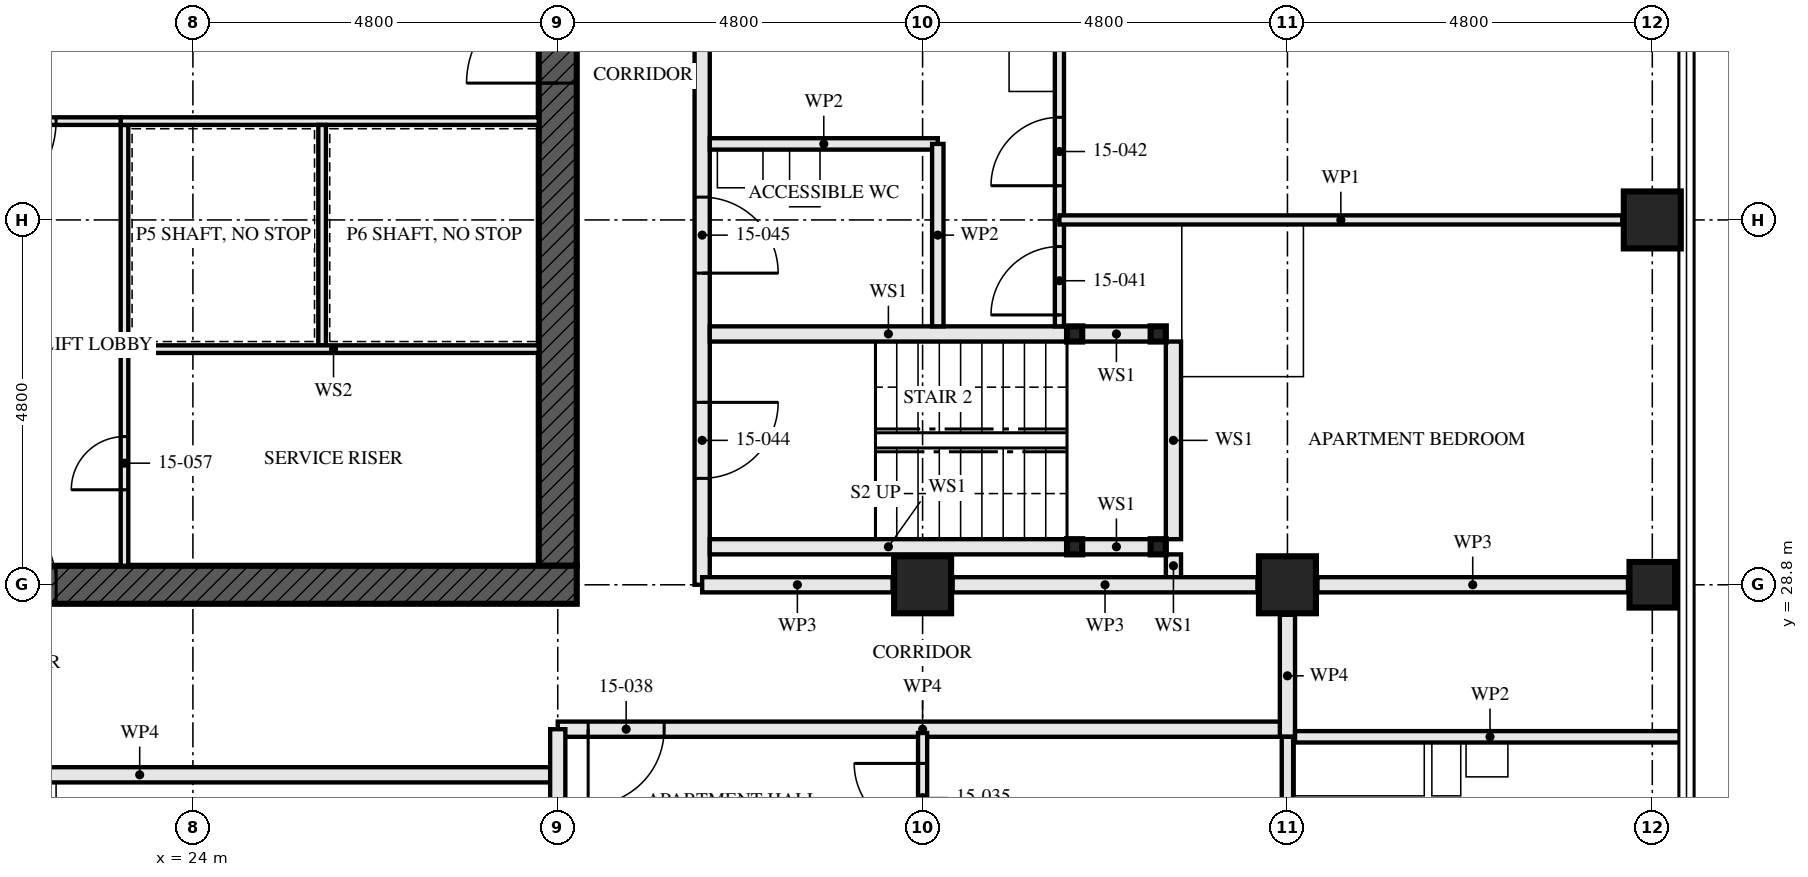
"""IFC4 building model, lengths in metres.
Left out: names, types, materials, properties, quantities, classifications, styles, units other than length and angle.
Written with IfcOpenShell. Run it as: python <this file> out.ifc"""

import sys

from ifc_helpers import new_model, si_unit, direction, frame, frame_2d, origin, origin_2d, place, context, subcontext, project, spatial, rectangle, hollow_rectangle, extrude, element, fill, save


model = new_model("IFC4")
c1 = context("Model", 3, precision=1e-05, world=origin(), true_north=direction((0.0, 1.0)))
c2 = subcontext(c1, "Body", "Model", "MODEL_VIEW")
j1 = project(units=[si_unit("LENGTHUNIT", "METRE"), si_unit("PLANEANGLEUNIT", "RADIAN")], contexts=[c1])
p1 = place(None, origin())
s1 = spatial("IfcSite", under=j1, at=p1, CompositionType="ELEMENT")
p2 = place(p1, origin())
s2 = spatial("IfcBuilding", under=s1, at=p2, CompositionType="ELEMENT")
p3 = place(p2, frame((0.0, 0.0, 58.5)))
s3 = spatial("IfcBuildingStorey", under=s2, at=p3, CompositionType="ELEMENT", Elevation=58.5)
for number, where, z_axis, x_axis in (
    (1, (33.6, 28.8, 0.0), (0.0, 0.0, 1.0), (0.0, 1.0, 0.0)),
    (2, (38.4, 28.8, 0.0), (0.0, 0.0, 1.0), (0.0, 1.0, 0.0)),
):
    element("IfcColumn", number, at=place(p3, frame(where, z_axis=z_axis, x_axis=x_axis)), inside=s3, PredefinedType="COLUMN", context=c2, shape_type="SweptSolid", body=[
        extrude(hollow_rectangle(XDim=0.75, YDim=0.75, WallThickness=0.08, at=origin_2d()), origin(), (0.0, 0.0, 1.0), 3.5),
    ])
p4 = place(p3, frame((43.2, 28.8, 0.0), z_axis=(0.0, 0.0, 1.0), x_axis=(0.0, 1.0, 0.0)))
e3 = element("IfcColumn", 3, at=p4, inside=s3, PredefinedType="COLUMN", context=c2, shape_type="SweptSolid", body=[
    extrude(hollow_rectangle(XDim=0.6, YDim=0.6, WallThickness=0.08, at=origin_2d()), origin(), (0.0, 0.0, 1.0), 3.5),
])
p5 = place(p3, frame((43.2, 33.6, 0.0), z_axis=(0.0, 0.0, 1.0), x_axis=(1.0, 0.0, 0.0)))
e4 = element("IfcColumn", 4, at=p5, inside=s3, PredefinedType="COLUMN", context=c2, shape_type="SweptSolid", body=[
    extrude(hollow_rectangle(XDim=0.75, YDim=0.75, WallThickness=0.08, at=origin_2d()), origin(), (0.0, 0.0, 1.0), 3.5),
])
p6 = place(p3, frame((14.15, 28.8, -0.17), z_axis=(0.0, 0.0, 1.0), x_axis=(1.0, 0.0, 0.0)))
e5 = element("IfcWall", 5, at=p6, inside=s3, PredefinedType="SHEAR", context=c2, shape_type="SweptSolid", body=[
    extrude(rectangle(XDim=14.9, YDim=0.5, at=frame_2d((7.45, 0.0))), origin(), (0.0, 0.0, 1.0), 3.5),
])
p7 = place(p6, frame((6.85, 0.0, 0.17)))
e6 = element("IfcOpeningElement", 6, at=p7, cuts=e5, PredefinedType="OPENING", context=c2, shape_type="SweptSolid", body=[
    extrude(rectangle(XDim=1.2, YDim=2.1, at=frame_2d((0.6, 1.05))), frame((0.0, 0.26, 0.0), z_axis=(0.0, -1.0, 0.0), x_axis=(1.0, 0.0, 0.0)), (0.0, 0.0, 1.0), 0.521),
])
p8 = place(p3, frame((28.8, 29.05, -0.17), z_axis=(0.0, 0.0, 1.0), x_axis=(0.0, 1.0, 0.0)))
e7 = element("IfcWall", 7, at=p8, inside=s3, PredefinedType="SHEAR", context=c2, shape_type="SweptSolid", body=[
    extrude(rectangle(XDim=13.9, YDim=0.5, at=frame_2d((6.95, 0.0))), origin(), (0.0, 0.0, 1.0), 3.5),
])
p9 = place(p8, frame((6.35, 0.0, 0.17)))
e8 = element("IfcOpeningElement", 8, at=p9, cuts=e7, PredefinedType="OPENING", context=c2, shape_type="SweptSolid", body=[
    extrude(rectangle(XDim=1.2, YDim=2.1, at=frame_2d((0.6, 1.05))), frame((0.0, 0.26, 0.0), z_axis=(0.0, -1.0, 0.0), x_axis=(1.0, 0.0, 0.0)), (0.0, 0.0, 1.0), 0.521),
])
for number, where, z_axis, x_axis in (
    (9, (36.7, 29.3, 0.0), (0.0, 0.0, 1.0), (1.0, 0.0, 0.0)),
    (10, (36.7, 32.1, 0.0), (0.0, 0.0, 1.0), (1.0, 0.0, 0.0)),
    (11, (35.6, 29.3, 0.0), (0.0, 0.0, 1.0), (1.0, 0.0, 0.0)),
    (12, (35.6, 32.1, 0.0), (0.0, 0.0, 1.0), (1.0, 0.0, 0.0)),
):
    element("IfcColumn", number, at=place(p3, frame(where, z_axis=z_axis, x_axis=x_axis)), inside=s3, PredefinedType="COLUMN", context=c2, shape_type="SweptSolid", body=[
        extrude(hollow_rectangle(XDim=0.2, YDim=0.2, WallThickness=0.008, at=origin_2d()), origin(), (0.0, 0.0, 1.0), 3.33),
    ])
p10 = place(p3, frame((17.8, 26.3, 0.0), z_axis=(0.0, 0.0, 1.0), x_axis=(1.0, 0.0, 0.0)))
e13 = element("IfcWall", 13, at=p10, inside=s3, PredefinedType="PARTITIONING", context=c2, shape_type="SweptSolid", body=[
    extrude(rectangle(XDim=11.0, YDim=0.2, at=frame_2d((5.5, 0.0))), origin(), (0.0, 0.0, 1.0), 2.55),
])
p11 = place(p10, frame((0.06, 0.0, 0.0)))
e14 = element("IfcOpeningElement", 14, at=p11, cuts=e13, PredefinedType="OPENING", context=c2, shape_type="SweptSolid", body=[
    extrude(rectangle(XDim=1.0, YDim=2.1, at=frame_2d((0.5, 1.05))), frame((0.0, 0.111, 0.0), z_axis=(0.0, -1.0, 0.0), x_axis=(1.0, 0.0, 0.0)), (0.0, 0.0, 1.0), 0.221),
])
p12 = place(p3, frame((38.4, 23.8, 0.0), z_axis=(0.0, 0.0, 1.0), x_axis=(0.0, 1.0, 0.0)))
e15 = element("IfcWall", 15, at=p12, inside=s3, PredefinedType="PARTITIONING", context=c2, shape_type="SweptSolid", body=[
    extrude(rectangle(XDim=3.0, YDim=0.15, at=frame_2d((1.5, 0.0))), origin(), (0.0, 0.0, 1.0), 2.55),
])
p13 = place(p12, frame((1.05, 0.0, 0.0)))
e16 = element("IfcOpeningElement", 16, at=p13, cuts=e15, PredefinedType="OPENING", context=c2, shape_type="SweptSolid", body=[
    extrude(rectangle(XDim=0.9, YDim=2.1, at=frame_2d((0.45, 1.05))), frame((0.0, 0.085, 0.0), z_axis=(0.0, -1.0, 0.0), x_axis=(1.0, 0.0, 0.0)), (0.0, 0.0, 1.0), 0.171),
])
p14 = place(p3, frame((33.6, 22.2, 0.0), z_axis=(0.0, 0.0, 1.0), x_axis=(0.0, 1.0, 0.0)))
e17 = element("IfcWall", 17, at=p14, inside=s3, PredefinedType="PARTITIONING", context=c2, shape_type="SweptSolid", body=[
    extrude(rectangle(XDim=4.65, YDim=0.12, at=frame_2d((2.325, 0.0))), origin(), (0.0, 0.0, 1.0), 2.55),
])
p15 = place(p14, frame((3.35, 0.0, 0.0)))
e18 = element("IfcOpeningElement", 18, at=p15, cuts=e17, PredefinedType="OPENING", context=c2, shape_type="SweptSolid", body=[
    extrude(rectangle(XDim=0.9, YDim=2.1, at=frame_2d((0.45, 1.05))), frame((0.0, 0.071, 0.0), z_axis=(0.0, -1.0, 0.0), x_axis=(1.0, 0.0, 0.0)), (0.0, 0.0, 1.0), 0.141),
])
p16 = place(p3, frame((28.8, 26.9, 0.0), z_axis=(0.0, 0.0, 1.0), x_axis=(1.0, 0.0, 0.0)))
e19 = element("IfcWall", 19, at=p16, inside=s3, PredefinedType="PARTITIONING", context=c2, shape_type="SweptSolid", body=[
    extrude(rectangle(XDim=9.6, YDim=0.2, at=frame_2d((4.8, 0.0))), origin(), (0.0, 0.0, 1.0), 3.33),
])
p17 = place(p16, frame((0.4, 0.0, 0.0)))
e20 = element("IfcOpeningElement", 20, at=p17, cuts=e19, PredefinedType="OPENING", context=c2, shape_type="SweptSolid", body=[
    extrude(rectangle(XDim=1.0, YDim=2.1, at=frame_2d((0.5, 1.05))), frame((0.0, 0.111, 0.0), z_axis=(0.0, -1.0, 0.0), x_axis=(1.0, 0.0, 0.0)), (0.0, 0.0, 1.0), 0.221),
])
p18 = place(p3, frame((38.4, 26.8, 0.0), z_axis=(0.0, 0.0, 1.0), x_axis=(0.0, 1.0, 0.0)))
e21 = element("IfcWall", 21, at=p18, inside=s3, PredefinedType="PARTITIONING", context=c2, shape_type="SweptSolid", body=[
    extrude(rectangle(XDim=1.605, YDim=0.2, at=frame_2d((0.802, 0.0))), origin(), (0.0, 0.0, 1.0), 3.33),
])
p19 = place(p3, frame((36.6, 29.3, 0.0), z_axis=(0.0, 0.0, 1.0), x_axis=(-1.0, 0.0, 0.0)))
e22 = element("IfcWall", 22, at=p19, inside=s3, PredefinedType="SOLIDWALL", context=c2, shape_type="SweptSolid", body=[
    extrude(rectangle(XDim=0.9, YDim=0.2, at=frame_2d((0.45, 0.0))), origin(), (0.0, 0.0, 1.0), 2.99),
])
p20 = place(p3, frame((35.5, 29.3, 0.0), z_axis=(0.0, 0.0, 1.0), x_axis=(-1.0, 0.0, 0.0)))
e23 = element("IfcWall", 23, at=p20, inside=s3, PredefinedType="SOLIDWALL", context=c2, shape_type="SweptSolid", body=[
    extrude(rectangle(XDim=4.7, YDim=0.2, at=frame_2d((2.35, 0.0))), origin(), (0.0, 0.0, 1.0), 2.99),
])
p21 = place(p3, frame((36.6, 32.1, 0.0), z_axis=(0.0, 0.0, 1.0), x_axis=(-1.0, 0.0, 0.0)))
e24 = element("IfcWall", 24, at=p21, inside=s3, PredefinedType="SOLIDWALL", context=c2, shape_type="SweptSolid", body=[
    extrude(rectangle(XDim=0.9, YDim=0.2, at=frame_2d((0.45, 0.0))), origin(), (0.0, 0.0, 1.0), 2.99),
])
p22 = place(p3, frame((35.5, 32.1, 0.0), z_axis=(0.0, 0.0, 1.0), x_axis=(-1.0, 0.0, 0.0)))
e25 = element("IfcWall", 25, at=p22, inside=s3, PredefinedType="SOLIDWALL", context=c2, shape_type="SweptSolid", body=[
    extrude(rectangle(XDim=4.7, YDim=0.2, at=frame_2d((2.35, 0.0))), origin(), (0.0, 0.0, 1.0), 2.99),
])
p23 = place(p3, frame((36.9, 28.9, 0.0), z_axis=(0.0, 0.0, 1.0), x_axis=(0.0, 1.0, 0.0)))
e26 = element("IfcWall", 26, at=p23, inside=s3, PredefinedType="SOLIDWALL", context=c2, shape_type="SweptSolid", body=[
    extrude(rectangle(XDim=0.3, YDim=0.2, at=frame_2d((0.15, 0.0))), origin(), (0.0, 0.0, 1.0), 3.33),
])
p24 = place(p3, frame((36.9, 29.4, 0.0), z_axis=(0.0, 0.0, 1.0), x_axis=(0.0, 1.0, 0.0)))
e27 = element("IfcWall", 27, at=p24, inside=s3, PredefinedType="SOLIDWALL", context=c2, shape_type="SweptSolid", body=[
    extrude(rectangle(XDim=2.6, YDim=0.2, at=frame_2d((1.3, 0.0))), origin(), (0.0, 0.0, 1.0), 3.33),
])
p25 = place(p3, frame((33.8, 32.2, 0.0), z_axis=(0.0, 0.0, 1.0), x_axis=(0.0, 1.0, 0.0)))
e28 = element("IfcWall", 28, at=p25, inside=s3, PredefinedType="PARTITIONING", context=c2, shape_type="SweptSolid", body=[
    extrude(rectangle(XDim=2.4, YDim=0.15, at=frame_2d((1.2, 0.0))), origin(), (0.0, 0.0, 1.0), 2.55),
])
p26 = place(p3, frame((33.8, 34.6, 0.0), z_axis=(0.0, 0.0, 1.0), x_axis=(-1.0, 0.0, 0.0)))
e29 = element("IfcWall", 29, at=p26, inside=s3, PredefinedType="PARTITIONING", context=c2, shape_type="SweptSolid", body=[
    extrude(rectangle(XDim=3.0, YDim=0.15, at=frame_2d((1.5, 0.0))), origin(), (0.0, 0.0, 1.0), 3.33),
])
p27 = place(p3, frame((35.4, 32.2, 0.0), z_axis=(0.0, 0.0, 1.0), x_axis=(0.0, 1.0, 0.0)))
e30 = element("IfcWall", 30, at=p27, inside=s3, PredefinedType="PARTITIONING", context=c2, shape_type="SweptSolid", body=[
    extrude(rectangle(XDim=1.4, YDim=0.12, at=frame_2d((0.7, 0.0))), origin(), (0.0, 0.0, 1.0), 3.33),
])
p28 = place(p27, frame((0.15, 0.0, 0.0)))
e31 = element("IfcOpeningElement", 31, at=p28, cuts=e30, PredefinedType="OPENING", context=c2, shape_type="SweptSolid", body=[
    extrude(rectangle(XDim=0.9, YDim=2.1, at=frame_2d((0.45, 1.05))), frame((0.0, 0.071, 0.0), z_axis=(0.0, -1.0, 0.0), x_axis=(1.0, 0.0, 0.0)), (0.0, 0.0, 1.0), 0.141),
])
p29 = place(p3, frame((35.4, 33.6, 0.0), z_axis=(0.0, 0.0, 1.0), x_axis=(0.0, 1.0, 0.0)))
e32 = element("IfcWall", 32, at=p29, inside=s3, PredefinedType="PARTITIONING", context=c2, shape_type="SweptSolid", body=[
    extrude(rectangle(XDim=4.8, YDim=0.12, at=frame_2d((2.4, 0.0))), origin(), (0.0, 0.0, 1.0), 3.33),
])
p30 = place(p29, frame((0.45, 0.0, 0.0)))
e33 = element("IfcOpeningElement", 33, at=p30, cuts=e32, PredefinedType="OPENING", context=c2, shape_type="SweptSolid", body=[
    extrude(rectangle(XDim=0.9, YDim=2.1, at=frame_2d((0.45, 1.05))), frame((0.0, 0.071, 0.0), z_axis=(0.0, -1.0, 0.0), x_axis=(1.0, 0.0, 0.0)), (0.0, 0.0, 1.0), 0.141),
])
p31 = place(p3, frame((42.805, 33.6, 0.0), z_axis=(0.0, 0.0, 1.0), x_axis=(-1.0, 0.0, 0.0)))
e34 = element("IfcWall", 34, at=p31, inside=s3, PredefinedType="PARTITIONING", context=c2, shape_type="SweptSolid", body=[
    extrude(rectangle(XDim=7.405, YDim=0.12, at=frame_2d((3.703, 0.0))), origin(), (0.0, 0.0, 1.0), 2.55),
])
p32 = place(p3, frame((30.7, 28.8, 0.0), z_axis=(0.0, 0.0, 1.0), x_axis=(0.0, 1.0, 0.0)))
e35 = element("IfcWall", 35, at=p32, inside=s3, PredefinedType="PARTITIONING", context=c2, shape_type="SweptSolid", body=[
    extrude(rectangle(XDim=14.4, YDim=0.2, at=frame_2d((7.2, 0.0))), origin(), (0.0, 0.0, 1.0), 2.55),
])
p33 = place(p32, frame((1.4, 0.0, 0.0)))
e36 = element("IfcOpeningElement", 36, at=p33, cuts=e35, PredefinedType="OPENING", context=c2, shape_type="SweptSolid", body=[
    extrude(rectangle(XDim=1.0, YDim=2.1, at=frame_2d((0.5, 1.05))), frame((0.0, 0.111, 0.0), z_axis=(0.0, -1.0, 0.0), x_axis=(1.0, 0.0, 0.0)), (0.0, 0.0, 1.0), 0.221),
])
p34 = place(p32, frame((4.1, 0.0, 0.0)))
e37 = element("IfcOpeningElement", 37, at=p34, cuts=e35, PredefinedType="OPENING", context=c2, shape_type="SweptSolid", body=[
    extrude(rectangle(XDim=1.0, YDim=2.1, at=frame_2d((0.5, 1.05))), frame((0.0, 0.111, 0.0), z_axis=(0.0, -1.0, 0.0), x_axis=(1.0, 0.0, 0.0)), (0.0, 0.0, 1.0), 0.221),
])
p35 = place(p32, frame((10.0, 0.0, 0.0)))
e38 = element("IfcOpeningElement", 38, at=p35, cuts=e35, PredefinedType="OPENING", context=c2, shape_type="SweptSolid", body=[
    extrude(rectangle(XDim=1.0, YDim=2.1, at=frame_2d((0.5, 1.05))), frame((0.0, 0.111, 0.0), z_axis=(0.0, -1.0, 0.0), x_axis=(1.0, 0.0, 0.0)), (0.0, 0.0, 1.0), 0.221),
])
p36 = place(p3, frame((23.1, 29.05, 0.0), z_axis=(0.0, 0.0, 1.0), x_axis=(0.0, 1.0, 0.0)))
e39 = element("IfcWall", 39, at=p36, inside=s3, PredefinedType="SOLIDWALL", context=c2, shape_type="SweptSolid", body=[
    extrude(rectangle(XDim=5.8, YDim=0.1, at=frame_2d((2.9, 0.0))), origin(), (0.0, 0.0, 1.0), 3.33),
])
p37 = place(p36, frame((1.0, 0.0, 0.0)))
e40 = element("IfcOpeningElement", 40, at=p37, cuts=e39, PredefinedType="OPENING", context=c2, shape_type="SweptSolid", body=[
    extrude(rectangle(XDim=0.7, YDim=2.1, at=frame_2d((0.35, 1.05))), frame((0.0, 0.061, 0.0), z_axis=(0.0, -1.0, 0.0), x_axis=(1.0, 0.0, 0.0)), (0.0, 0.0, 1.0), 0.121),
])
p38 = place(p3, frame((23.05, 34.9, 0.0), z_axis=(0.0, 0.0, 1.0), x_axis=(1.0, 0.0, 0.0)))
e41 = element("IfcWall", 41, at=p38, inside=s3, PredefinedType="SOLIDWALL", context=c2, shape_type="SweptSolid", body=[
    extrude(rectangle(XDim=5.5, YDim=0.1, at=frame_2d((2.75, 0.0))), origin(), (0.0, 0.0, 1.0), 3.33),
])
p39 = place(p3, frame((20.55, 34.9, 0.0), z_axis=(0.0, 0.0, 1.0), x_axis=(1.0, 0.0, 0.0)))
e42 = element("IfcWall", 42, at=p39, inside=s3, PredefinedType="SOLIDWALL", context=c2, shape_type="SweptSolid", body=[
    extrude(rectangle(XDim=2.5, YDim=0.1, at=frame_2d((1.25, 0.0))), origin(), (0.0, 0.0, 1.0), 3.33),
])
p40 = place(p39, frame((0.45, 0.0, 0.0)))
e43 = element("IfcOpeningElement", 43, at=p40, cuts=e42, PredefinedType="OPENING", context=c2, shape_type="SweptSolid", body=[
    extrude(rectangle(XDim=1.2, YDim=2.1, at=frame_2d((0.6, 1.05))), frame((0.0, 0.061, 0.0), z_axis=(0.0, -1.0, 0.0), x_axis=(1.0, 0.0, 0.0)), (0.0, 0.0, 1.0), 0.121),
])
p41 = place(p3, frame((25.7, 31.95, 0.0), z_axis=(0.0, 0.0, 1.0), x_axis=(0.0, 1.0, 0.0)))
e44 = element("IfcWall", 44, at=p41, inside=s3, PredefinedType="SOLIDWALL", context=c2, shape_type="SweptSolid", body=[
    extrude(rectangle(XDim=2.9, YDim=0.1, at=frame_2d((1.45, 0.0))), origin(), (0.0, 0.0, 1.0), 3.33),
])
p42 = place(p3, frame((23.15, 31.9, 0.0), z_axis=(0.0, 0.0, 1.0), x_axis=(1.0, 0.0, 0.0)))
e45 = element("IfcWall", 45, at=p42, inside=s3, PredefinedType="SOLIDWALL", context=c2, shape_type="SweptSolid", body=[
    extrude(rectangle(XDim=5.4, YDim=0.1, at=frame_2d((2.7, 0.0))), origin(), (0.0, 0.0, 1.0), 3.33),
])
p43 = place(p3, frame((28.8, 24.395, 0.0), z_axis=(0.0, 0.0, 1.0), x_axis=(0.0, 1.0, 0.0)))
e46 = element("IfcWall", 46, at=p43, inside=s3, PredefinedType="PARTITIONING", context=c2, shape_type="SweptSolid", body=[
    extrude(rectangle(XDim=2.505, YDim=0.2, at=frame_2d((1.252, 0.0))), origin(), (0.0, 0.0, 1.0), 2.32),
])
p44 = place(p3, frame((42.88, 28.8, 0.0), z_axis=(0.0, 0.0, 1.0), x_axis=(-1.0, 0.0, 0.0)))
e47 = element("IfcWall", 47, at=p44, inside=s3, PredefinedType="PARTITIONING", context=c2, shape_type="SweptSolid", body=[
    extrude(rectangle(XDim=4.085, YDim=0.2, at=frame_2d((2.042, 0.0))), origin(), (0.0, 0.0, 1.0), 2.32),
])
p45 = place(p3, frame((38.005, 28.8, 0.0), z_axis=(0.0, 0.0, 1.0), x_axis=(-1.0, 0.0, 0.0)))
e48 = element("IfcWall", 48, at=p45, inside=s3, PredefinedType="PARTITIONING", context=c2, shape_type="SweptSolid", body=[
    extrude(rectangle(XDim=4.01, YDim=0.2, at=frame_2d((2.005, 0.0))), origin(), (0.0, 0.0, 1.0), 2.32),
])
p46 = place(p3, frame((33.205, 28.8, 0.0), z_axis=(0.0, 0.0, 1.0), x_axis=(-1.0, 0.0, 0.0)))
e49 = element("IfcWall", 49, at=p46, inside=s3, PredefinedType="PARTITIONING", context=c2, shape_type="SweptSolid", body=[
    extrude(rectangle(XDim=2.505, YDim=0.2, at=frame_2d((1.252, 0.0))), origin(), (0.0, 0.0, 1.0), 2.32),
])
p47 = place(p3, frame((38.5, 26.8, 0.0), z_axis=(0.0, 0.0, 1.0), x_axis=(1.0, 0.0, 0.0)))
e50 = element("IfcWall", 50, at=p47, inside=s3, PredefinedType="PARTITIONING", context=c2, shape_type="SweptSolid", body=[
    extrude(rectangle(XDim=5.13, YDim=0.15, at=frame_2d((2.565, 0.0))), origin(), (0.0, 0.0, 1.0), 2.32),
])
p48 = place(p15, origin())
e51 = element("IfcDoor", 51, at=p48, inside=s3, OperationType="SINGLE_SWING_LEFT", PredefinedType="DOOR", context=c2, shape_type="SweptSolid", body=[
    extrude(rectangle(XDim=0.9, YDim=2.1, at=frame_2d((0.45, 1.05))), frame((0.0, 0.022, 0.0), z_axis=(0.0, -1.0, 0.0), x_axis=(1.0, 0.0, 0.0)), (0.0, 0.0, 1.0), 0.044),
])
fill(e18, e51)
p49 = place(p17, frame((1.0, 0.0, 0.0), z_axis=(0.0, 0.0, 1.0), x_axis=(-1.0, 0.0, 0.0)))
e52 = element("IfcDoor", 52, at=p49, inside=s3, OperationType="SINGLE_SWING_LEFT", PredefinedType="DOOR", context=c2, shape_type="SweptSolid", body=[
    extrude(rectangle(XDim=1.0, YDim=2.1, at=frame_2d((0.5, 1.05))), frame((0.0, 0.027, 0.0), z_axis=(0.0, -1.0, 0.0), x_axis=(1.0, 0.0, 0.0)), (0.0, 0.0, 1.0), 0.054),
])
fill(e20, e52)
p50 = place(p28, origin())
e53 = element("IfcDoor", 53, at=p50, inside=s3, OperationType="SINGLE_SWING_RIGHT", PredefinedType="DOOR", context=c2, shape_type="SweptSolid", body=[
    extrude(rectangle(XDim=0.9, YDim=2.1, at=frame_2d((0.45, 1.05))), frame((0.0, 0.022, 0.0), z_axis=(0.0, -1.0, 0.0), x_axis=(1.0, 0.0, 0.0)), (0.0, 0.0, 1.0), 0.044),
])
fill(e31, e53)
p51 = place(p30, origin())
e54 = element("IfcDoor", 54, at=p51, inside=s3, OperationType="SINGLE_SWING_RIGHT", PredefinedType="DOOR", context=c2, shape_type="SweptSolid", body=[
    extrude(rectangle(XDim=0.9, YDim=2.1, at=frame_2d((0.45, 1.05))), frame((0.0, 0.022, 0.0), z_axis=(0.0, -1.0, 0.0), x_axis=(1.0, 0.0, 0.0)), (0.0, 0.0, 1.0), 0.044),
])
fill(e33, e54)
p52 = place(p33, frame((1.0, 0.0, 0.0), z_axis=(0.0, 0.0, 1.0), x_axis=(-1.0, 0.0, 0.0)))
e55 = element("IfcDoor", 55, at=p52, inside=s3, OperationType="SINGLE_SWING_RIGHT", PredefinedType="DOOR", context=c2, shape_type="SweptSolid", body=[
    extrude(rectangle(XDim=1.0, YDim=2.1, at=frame_2d((0.5, 1.05))), frame((0.0, 0.032, 0.0), z_axis=(0.0, -1.0, 0.0), x_axis=(1.0, 0.0, 0.0)), (0.0, 0.0, 1.0), 0.064),
])
fill(e36, e55)
p53 = place(p34, frame((1.0, 0.0, 0.0), z_axis=(0.0, 0.0, 1.0), x_axis=(-1.0, 0.0, 0.0)))
e56 = element("IfcDoor", 56, at=p53, inside=s3, OperationType="SINGLE_SWING_LEFT", PredefinedType="DOOR", context=c2, shape_type="SweptSolid", body=[
    extrude(rectangle(XDim=1.0, YDim=2.1, at=frame_2d((0.5, 1.05))), frame((0.0, 0.027, 0.0), z_axis=(0.0, -1.0, 0.0), x_axis=(1.0, 0.0, 0.0)), (0.0, 0.0, 1.0), 0.054),
])
fill(e37, e56)
p54 = place(p37, origin())
e57 = element("IfcDoor", 57, at=p54, inside=s3, OperationType="SINGLE_SWING_RIGHT", PredefinedType="DOOR", context=c2, shape_type="SweptSolid", body=[
    extrude(rectangle(XDim=0.7, YDim=2.1, at=frame_2d((0.35, 1.05))), frame((0.0, 0.027, 0.0), z_axis=(0.0, -1.0, 0.0), x_axis=(1.0, 0.0, 0.0)), (0.0, 0.0, 1.0), 0.054),
])
fill(e40, e57)
p55 = place(p40, frame((1.2, 0.0, 0.0), z_axis=(0.0, 0.0, 1.0), x_axis=(-1.0, 0.0, 0.0)))
e58 = element("IfcDoor", 58, at=p55, inside=s3, OperationType="SINGLE_SWING_LEFT", PredefinedType="DOOR", context=c2, shape_type="SweptSolid", body=[
    extrude(rectangle(XDim=1.2, YDim=2.1, at=frame_2d((0.6, 1.05))), frame((0.0, 0.027, 0.0), z_axis=(0.0, -1.0, 0.0), x_axis=(1.0, 0.0, 0.0)), (0.0, 0.0, 1.0), 0.054),
])
fill(e43, e58)
p56 = place(p7, origin())
e59 = element("IfcDoor", 59, at=p56, inside=s3, OperationType="SINGLE_SWING_LEFT", PredefinedType="DOOR", context=c2, shape_type="SweptSolid", body=[
    extrude(rectangle(XDim=1.2, YDim=2.1, at=frame_2d((0.6, 1.05))), frame((0.0, 0.027, 0.0), z_axis=(0.0, -1.0, 0.0), x_axis=(1.0, 0.0, 0.0)), (0.0, 0.0, 1.0), 0.054),
])
fill(e6, e59)
p57 = place(p9, origin())
e60 = element("IfcDoor", 60, at=p57, inside=s3, OperationType="SINGLE_SWING_LEFT", PredefinedType="DOOR", context=c2, shape_type="SweptSolid", body=[
    extrude(rectangle(XDim=1.2, YDim=2.1, at=frame_2d((0.6, 1.05))), frame((0.0, 0.027, 0.0), z_axis=(0.0, -1.0, 0.0), x_axis=(1.0, 0.0, 0.0)), (0.0, 0.0, 1.0), 0.054),
])
fill(e8, e60)
save(model, sys.argv[1])
